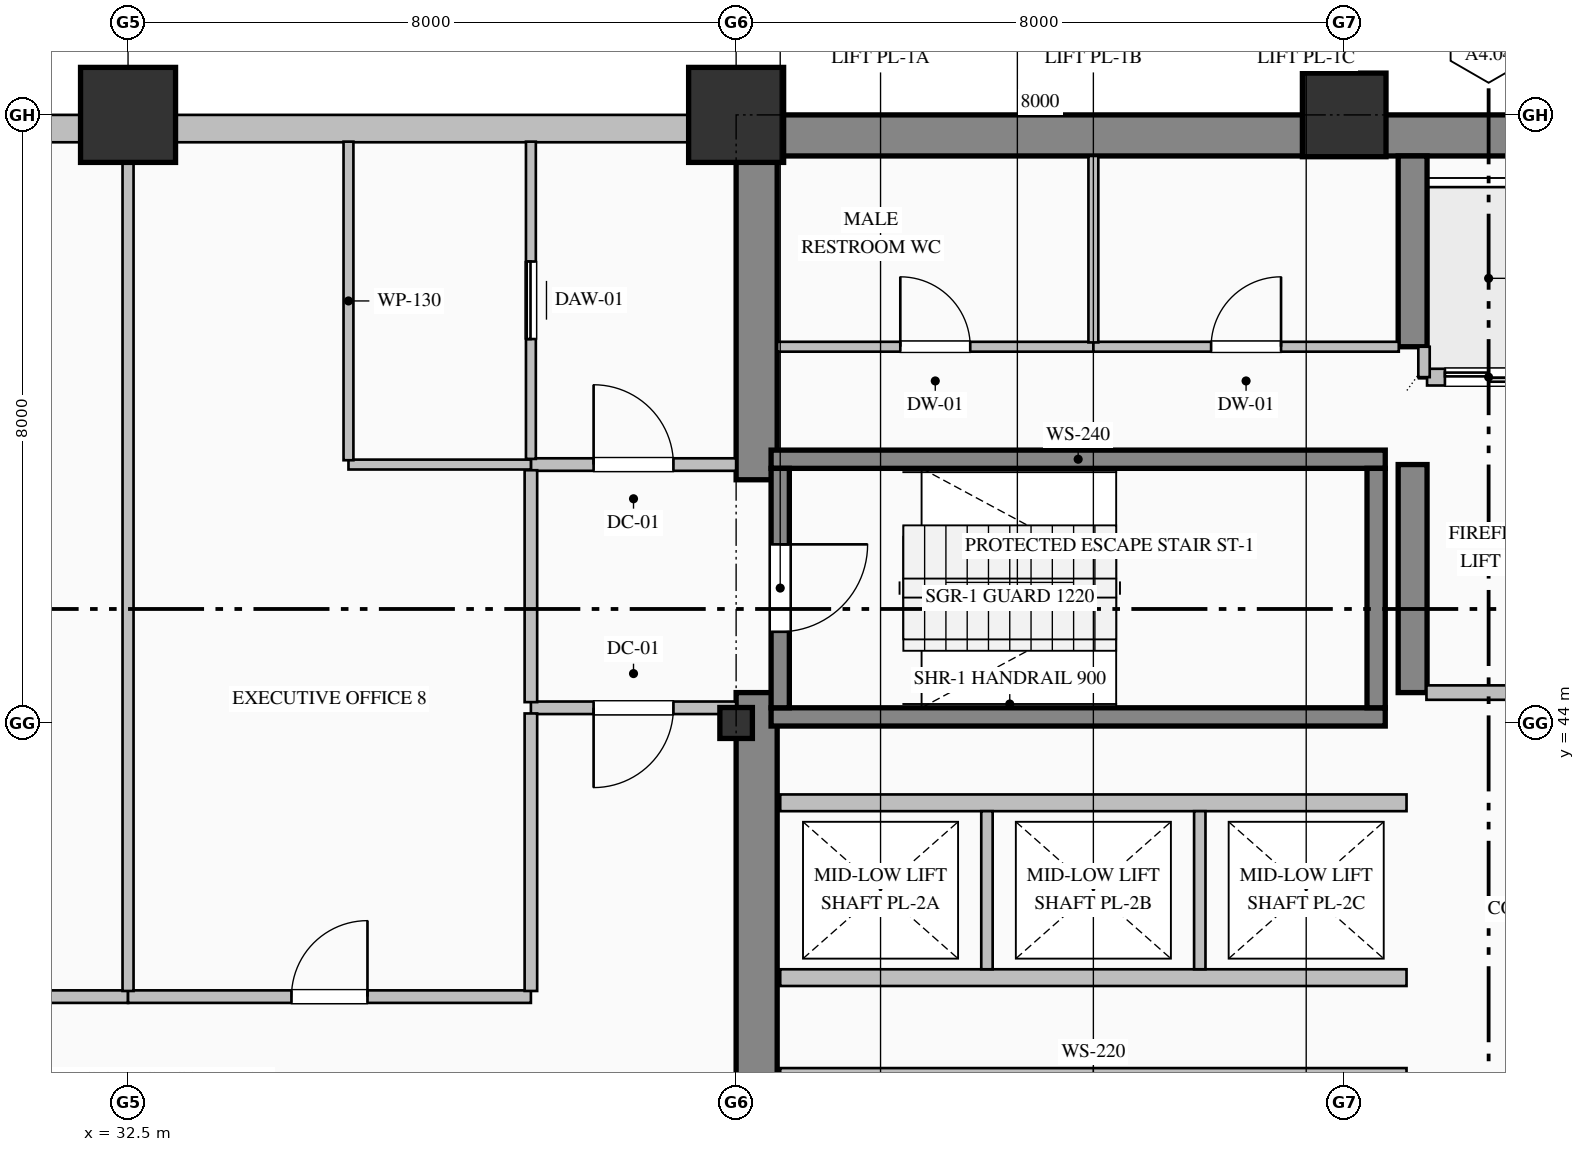
"""IFC4 building model, lengths in metres.
Left out: names, types, materials, properties, quantities, classifications, styles, units other than length and angle.
Written with IfcOpenShell. Run it as: python <this file> out.ifc"""

import sys

from ifc_helpers import new_model, si_unit, direction, frame, frame_2d, origin, origin_2d, place, context, subcontext, project, spatial, rectangle, hollow_rectangle, i_section, extrude, element, fill, save


model = new_model("IFC4")
c1 = context("Model", 3, precision=1e-05, world=origin(), true_north=direction((0.0, 1.0)))
c2 = subcontext(c1, "Body", "Model", "MODEL_VIEW")
j1 = project(units=[si_unit("LENGTHUNIT", "METRE"), si_unit("PLANEANGLEUNIT", "RADIAN")], contexts=[c1])
p1 = place(None, origin())
s1 = spatial("IfcSite", under=j1, at=p1, CompositionType="ELEMENT")
p2 = place(p1, origin())
s2 = spatial("IfcBuilding", under=s1, at=p2, CompositionType="ELEMENT")
p3 = place(p2, frame((0.0, 0.0, 36.2)))
s3 = spatial("IfcBuildingStorey", under=s2, at=p3, CompositionType="ELEMENT", Elevation=36.2)
p4 = place(p3, frame((40.5, 51.73, 0.0), z_axis=(0.0, 0.0, 1.0), x_axis=(1.0, 0.0, 0.0)))
e1 = element("IfcWall", 1, at=p4, inside=s3, PredefinedType="SHEAR", context=c2, shape_type="SweptSolid", body=[
    extrude(rectangle(XDim=23.5, YDim=0.54, at=frame_2d((11.75, 0.0))), origin(), (0.0, 0.0, 1.0), 3.75),
])
p5 = place(p3, frame((40.77, 36.54, 0.0), z_axis=(0.0, 0.0, 1.0), x_axis=(0.0, 1.0, 0.0)))
e2 = element("IfcWall", 2, at=p5, inside=s3, PredefinedType="SHEAR", context=c2, shape_type="SweptSolid", body=[
    extrude(rectangle(XDim=7.86, YDim=0.54, at=frame_2d((3.93, 0.0))), origin(), (0.0, 0.0, 1.0), 3.75),
])
p6 = place(p3, frame((40.77, 47.2, 0.0), z_axis=(0.0, 0.0, 1.0), x_axis=(0.0, 1.0, 0.0)))
e3 = element("IfcWall", 3, at=p6, inside=s3, PredefinedType="SHEAR", context=c2, shape_type="SweptSolid", body=[
    extrude(rectangle(XDim=4.26, YDim=0.54, at=frame_2d((2.13, 0.0))), origin(), (0.0, 0.0, 1.0), 3.75),
])
p7 = place(p3, frame((49.4, 44.4, 0.0), z_axis=(0.0, 0.0, 1.0), x_axis=(0.0, 1.0, 0.0)))
e4 = element("IfcWall", 4, at=p7, inside=s3, PredefinedType="SHEAR", context=c2, shape_type="SweptSolid", body=[
    extrude(rectangle(XDim=3.0, YDim=0.38, at=frame_2d((1.5, 0.0))), origin(), (0.0, 0.0, 1.0), 3.75),
])
p8 = place(p3, frame((49.4, 48.95, 0.0), z_axis=(0.0, 0.0, 1.0), x_axis=(0.0, 1.0, 0.0)))
e5 = element("IfcWall", 5, at=p8, inside=s3, PredefinedType="SHEAR", context=c2, shape_type="SweptSolid", body=[
    extrude(rectangle(XDim=2.51, YDim=0.38, at=frame_2d((1.255, 0.0))), origin(), (0.0, 0.0, 1.0), 3.75),
])
p9 = place(p3, frame((32.5, 52.0, 0.0), z_axis=(0.0, 0.0, 1.0), x_axis=(1.0, 0.0, 0.0)))
e6 = element("IfcColumn", 6, at=p9, inside=s3, PredefinedType="COLUMN", context=c2, shape_type="SweptSolid", body=[
    extrude(hollow_rectangle(XDim=1.25, YDim=1.25, WallThickness=0.045, at=origin_2d()), origin(), (0.0, 0.0, 1.0), 4.0),
])
p10 = place(p3, frame((40.5, 44.0, 0.0), z_axis=(0.0, 0.0, 1.0), x_axis=(1.0, 0.0, 0.0)))
e7 = element("IfcColumn", 7, at=p10, inside=s3, PredefinedType="COLUMN", context=c2, shape_type="SweptSolid", body=[
    extrude(i_section(OverallWidth=0.407, OverallDepth=0.428, WebThickness=0.02, FlangeThickness=0.035, FilletRadius=0.022, at=origin_2d()), origin(), (0.0, 0.0, 1.0), 4.0),
])
p11 = place(p3, frame((40.5, 52.0, 0.0), z_axis=(0.0, 0.0, 1.0), x_axis=(1.0, 0.0, 0.0)))
e8 = element("IfcColumn", 8, at=p11, inside=s3, PredefinedType="COLUMN", context=c2, shape_type="SweptSolid", body=[
    extrude(hollow_rectangle(XDim=1.25, YDim=1.25, WallThickness=0.045, at=origin_2d()), origin(), (0.0, 0.0, 1.0), 4.0),
])
p12 = place(p3, frame((48.5, 52.0, 0.0), z_axis=(0.0, 0.0, 1.0), x_axis=(1.0, 0.0, 0.0)))
e9 = element("IfcColumn", 9, at=p12, inside=s3, PredefinedType="COLUMN", context=c2, shape_type="SweptSolid", body=[
    extrude(hollow_rectangle(XDim=1.1, YDim=1.1, WallThickness=0.04, at=origin_2d()), origin(), (0.0, 0.0, 1.0), 4.0),
])
p13 = place(p3, frame((4.0, 51.82, 0.0), z_axis=(0.0, 0.0, 1.0), x_axis=(1.0, 0.0, 0.0)))
e10 = element("IfcWall", 10, at=p13, inside=s3, PredefinedType="SOLIDWALL", context=c2, shape_type="SweptSolid", body=[
    extrude(rectangle(XDim=36.52, YDim=0.36, at=frame_2d((18.26, 0.0))), origin(), (0.0, 0.0, 1.0), 3.25),
])
p14 = place(p13, frame((6.0, 0.0, 0.8)))
e11 = element("IfcOpeningElement", 11, at=p14, cuts=e10, PredefinedType="OPENING", context=c2, shape_type="SweptSolid", body=[
    extrude(rectangle(XDim=2.4, YDim=2.15, at=frame_2d((1.2, 1.075))), frame((0.0, 0.19, 0.0), z_axis=(0.0, -1.0, 0.0), x_axis=(1.0, 0.0, 0.0)), (0.0, 0.0, 1.0), 0.38),
])
p15 = place(p13, frame((24.15, 0.0, 0.85)))
e12 = element("IfcOpeningElement", 12, at=p15, cuts=e10, PredefinedType="OPENING", context=c2, shape_type="SweptSolid", body=[
    extrude(rectangle(XDim=2.1, YDim=2.05, at=frame_2d((1.05, 1.025))), frame((0.0, 0.19, 0.0), z_axis=(0.0, -1.0, 0.0), x_axis=(1.0, 0.0, 0.0)), (0.0, 0.0, 1.0), 0.38),
])
for number, where, z_axis, x_axis in (
    (13, (40.96, 47.47, 0.0), (0.0, 0.0, 1.0), (1.0, 0.0, 0.0)),
    (14, (49.04, 44.08, 0.0), (0.0, 0.0, 1.0), (-1.0, 0.0, 0.0)),
):
    element("IfcWall", number, at=place(p3, frame(where, z_axis=z_axis, x_axis=x_axis)), inside=s3, PredefinedType="SOLIDWALL", context=c2, shape_type="SweptSolid", body=[
        extrude(rectangle(XDim=8.08, YDim=0.24, at=frame_2d((4.04, 0.0))), origin(), (0.0, 0.0, 1.0), 4.0),
    ])
p16 = place(p3, frame((41.08, 47.35, 0.0), z_axis=(0.0, 0.0, 1.0), x_axis=(0.0, -1.0, 0.0)))
e15 = element("IfcWall", 15, at=p16, inside=s3, PredefinedType="SOLIDWALL", context=c2, shape_type="SweptSolid", body=[
    extrude(rectangle(XDim=3.15, YDim=0.24, at=frame_2d((1.575, 0.0))), origin(), (0.0, 0.0, 1.0), 4.0),
])
p17 = place(p16, frame((1.0, 0.0, 0.0)))
e16 = element("IfcOpeningElement", 16, at=p17, cuts=e15, PredefinedType="OPENING", context=c2, shape_type="SweptSolid", body=[
    extrude(rectangle(XDim=1.15, YDim=2.2, at=frame_2d((0.575, 1.1))), frame((0.0, 0.13, 0.0), z_axis=(0.0, -1.0, 0.0), x_axis=(1.0, 0.0, 0.0)), (0.0, 0.0, 1.0), 0.26),
])
p18 = place(p3, frame((48.92, 44.2, 0.0), z_axis=(0.0, 0.0, 1.0), x_axis=(0.0, 1.0, 0.0)))
e17 = element("IfcWall", 17, at=p18, inside=s3, PredefinedType="SOLIDWALL", context=c2, shape_type="SweptSolid", body=[
    extrude(rectangle(XDim=3.15, YDim=0.24, at=frame_2d((1.575, 0.0))), origin(), (0.0, 0.0, 1.0), 4.0),
])
p19 = place(p3, frame((54.71, 48.55, 0.0), z_axis=(0.0, 0.0, 1.0), x_axis=(-1.0, 0.0, 0.0)))
e18 = element("IfcWall", 18, at=p19, inside=s3, PredefinedType="PARTITIONING", context=c2, shape_type="SweptSolid", body=[
    extrude(rectangle(XDim=5.12, YDim=0.22, at=frame_2d((2.56, 0.0))), origin(), (0.0, 0.0, 1.0), 3.75),
])
p20 = place(p19, frame((3.735, 0.0, 0.0)))
e19 = element("IfcOpeningElement", 19, at=p20, cuts=e18, PredefinedType="OPENING", context=c2, shape_type="SweptSolid", body=[
    extrude(rectangle(XDim=1.15, YDim=2.2, at=frame_2d((0.575, 1.1))), frame((0.0, 0.12, 0.0), z_axis=(0.0, -1.0, 0.0), x_axis=(1.0, 0.0, 0.0)), (0.0, 0.0, 1.0), 0.24),
])
p21 = place(p19, frame((0.935, 0.0, 0.0)))
e20 = element("IfcOpeningElement", 20, at=p21, cuts=e18, PredefinedType="OPENING", context=c2, shape_type="SweptSolid", body=[
    extrude(rectangle(XDim=1.15, YDim=2.2, at=frame_2d((0.575, 1.1))), frame((0.0, 0.12, 0.0), z_axis=(0.0, -1.0, 0.0), x_axis=(1.0, 0.0, 0.0)), (0.0, 0.0, 1.0), 0.24),
])
p22 = place(p3, frame((49.55, 48.55, 0.0), z_axis=(0.0, 0.0, 1.0), x_axis=(0.0, 1.0, 0.0)))
e21 = element("IfcWall", 21, at=p22, inside=s3, PredefinedType="PARTITIONING", context=c2, shape_type="SweptSolid", body=[
    extrude(rectangle(XDim=0.4, YDim=0.15, at=frame_2d((0.2, 0.0))), origin(), (0.0, 0.0, 1.0), 3.75),
])
for number, where, z_axis, x_axis in (
    (22, (41.08, 39.35, 0.0), (0.0, 0.0, 1.0), (1.0, 0.0, 0.0)),
    (23, (49.32, 40.65, 0.0), (0.0, 0.0, 1.0), (-1.0, 0.0, 0.0)),
    (24, (41.08, 42.95, 0.0), (0.0, 0.0, 1.0), (1.0, 0.0, 0.0)),
):
    element("IfcWall", number, at=place(p3, frame(where, z_axis=z_axis, x_axis=x_axis)), inside=s3, PredefinedType="PARTITIONING", context=c2, shape_type="SweptSolid", body=[
        extrude(rectangle(XDim=8.24, YDim=0.22, at=frame_2d((4.12, 0.0))), origin(), (0.0, 0.0, 1.0), 3.75),
    ])
for number, where, z_axis, x_axis in (
    (25, (43.8, 40.76, 0.0), (0.0, 0.0, 1.0), (0.0, 1.0, 0.0)),
    (26, (46.6, 40.76, 0.0), (0.0, 0.0, 1.0), (0.0, 1.0, 0.0)),
):
    element("IfcWall", number, at=place(p3, frame(where, z_axis=z_axis, x_axis=x_axis)), inside=s3, PredefinedType="PARTITIONING", context=c2, shape_type="SweptSolid", body=[
        extrude(rectangle(XDim=2.08, YDim=0.15, at=frame_2d((1.04, 0.0))), origin(), (0.0, 0.0, 1.0), 3.75),
    ])
p23 = place(p3, frame((37.8, 47.4, 0.0), z_axis=(0.0, 0.0, 1.0), x_axis=(1.0, 0.0, 0.0)))
e27 = element("IfcWall", 27, at=p23, inside=s3, PredefinedType="PARTITIONING", context=c2, shape_type="SweptSolid", body=[
    extrude(rectangle(XDim=2.7, YDim=0.165, at=frame_2d((1.35, 0.0))), origin(), (0.0, 0.0, 1.0), 3.75),
])
p24 = place(p23, frame((0.825, 0.0, 0.0)))
e28 = element("IfcOpeningElement", 28, at=p24, cuts=e27, PredefinedType="OPENING", context=c2, shape_type="SweptSolid", body=[
    extrude(rectangle(XDim=1.05, YDim=2.15, at=frame_2d((0.525, 1.075))), frame((0.0, 0.093, 0.0), z_axis=(0.0, -1.0, 0.0), x_axis=(1.0, 0.0, 0.0)), (0.0, 0.0, 1.0), 0.185),
])
p25 = place(p3, frame((40.5, 44.2, 0.0), z_axis=(0.0, 0.0, 1.0), x_axis=(-1.0, 0.0, 0.0)))
e29 = element("IfcWall", 29, at=p25, inside=s3, PredefinedType="PARTITIONING", context=c2, shape_type="SweptSolid", body=[
    extrude(rectangle(XDim=2.7, YDim=0.165, at=frame_2d((1.35, 0.0))), origin(), (0.0, 0.0, 1.0), 3.75),
])
p26 = place(p25, frame((0.825, 0.0, 0.0)))
e30 = element("IfcOpeningElement", 30, at=p26, cuts=e29, PredefinedType="OPENING", context=c2, shape_type="SweptSolid", body=[
    extrude(rectangle(XDim=1.05, YDim=2.15, at=frame_2d((0.525, 1.075))), frame((0.0, 0.093, 0.0), z_axis=(0.0, -1.0, 0.0), x_axis=(1.0, 0.0, 0.0)), (0.0, 0.0, 1.0), 0.185),
])
p27 = place(p3, frame((37.8, 44.274, 0.0), z_axis=(0.0, 0.0, 1.0), x_axis=(0.0, 1.0, 0.0)))
e31 = element("IfcWall", 31, at=p27, inside=s3, PredefinedType="PARTITIONING", context=c2, shape_type="SweptSolid", body=[
    extrude(rectangle(XDim=3.051, YDim=0.165, at=frame_2d((1.525, 0.0))), origin(), (0.0, 0.0, 1.0), 3.75),
])
p28 = place(p3, frame((37.8, 47.475, 0.0), z_axis=(0.0, 0.0, 1.0), x_axis=(0.0, 1.0, 0.0)))
e32 = element("IfcWall", 32, at=p28, inside=s3, PredefinedType="PARTITIONING", context=c2, shape_type="SweptSolid", body=[
    extrude(rectangle(XDim=4.173, YDim=0.13, at=frame_2d((2.087, 0.0))), origin(), (0.0, 0.0, 1.0), 3.75),
])
p29 = place(p28, frame((1.577, 0.0, 0.0)))
e33 = element("IfcOpeningElement", 33, at=p29, cuts=e32, PredefinedType="OPENING", context=c2, shape_type="SweptSolid", body=[
    extrude(rectangle(XDim=1.02, YDim=2.15, at=frame_2d((0.51, 1.075))), frame((0.0, 0.075, 0.0), z_axis=(0.0, -1.0, 0.0), x_axis=(1.0, 0.0, 0.0)), (0.0, 0.0, 1.0), 0.15),
])
p30 = place(p3, frame((37.8, 47.4, 0.0), z_axis=(0.0, 0.0, 1.0), x_axis=(-1.0, 0.0, 0.0)))
e34 = element("IfcWall", 34, at=p30, inside=s3, PredefinedType="PARTITIONING", context=c2, shape_type="SweptSolid", body=[
    extrude(rectangle(XDim=2.4, YDim=0.13, at=frame_2d((1.2, 0.0))), origin(), (0.0, 0.0, 1.0), 3.75),
])
p31 = place(p3, frame((35.4, 47.457, 0.0), z_axis=(0.0, 0.0, 1.0), x_axis=(0.0, 1.0, 0.0)))
e35 = element("IfcWall", 35, at=p31, inside=s3, PredefinedType="PARTITIONING", context=c2, shape_type="SweptSolid", body=[
    extrude(rectangle(XDim=4.191, YDim=0.13, at=frame_2d((2.095, 0.0))), origin(), (0.0, 0.0, 1.0), 3.75),
])
p32 = place(p3, frame((41.04, 48.95, 0.0), z_axis=(0.0, 0.0, 1.0), x_axis=(1.0, 0.0, 0.0)))
e36 = element("IfcWall", 36, at=p32, inside=s3, PredefinedType="PARTITIONING", context=c2, shape_type="SweptSolid", body=[
    extrude(rectangle(XDim=4.16, YDim=0.13, at=frame_2d((2.08, 0.0))), origin(), (0.0, 0.0, 1.0), 3.75),
])
p33 = place(p32, frame((1.62, 0.0, 0.0)))
e37 = element("IfcOpeningElement", 37, at=p33, cuts=e36, PredefinedType="OPENING", context=c2, shape_type="SweptSolid", body=[
    extrude(rectangle(XDim=0.92, YDim=2.15, at=frame_2d((0.46, 1.075))), frame((0.0, 0.075, 0.0), z_axis=(0.0, -1.0, 0.0), x_axis=(1.0, 0.0, 0.0)), (0.0, 0.0, 1.0), 0.15),
])
p34 = place(p3, frame((45.2, 48.95, 0.0), z_axis=(0.0, 0.0, 1.0), x_axis=(1.0, 0.0, 0.0)))
e38 = element("IfcWall", 38, at=p34, inside=s3, PredefinedType="PARTITIONING", context=c2, shape_type="SweptSolid", body=[
    extrude(rectangle(XDim=4.018, YDim=0.13, at=frame_2d((2.009, 0.0))), origin(), (0.0, 0.0, 1.0), 3.75),
])
p35 = place(p34, frame((1.549, 0.0, 0.0)))
e39 = element("IfcOpeningElement", 39, at=p35, cuts=e38, PredefinedType="OPENING", context=c2, shape_type="SweptSolid", body=[
    extrude(rectangle(XDim=0.92, YDim=2.15, at=frame_2d((0.46, 1.075))), frame((0.0, 0.075, 0.0), z_axis=(0.0, -1.0, 0.0), x_axis=(1.0, 0.0, 0.0)), (0.0, 0.0, 1.0), 0.15),
])
p36 = place(p3, frame((54.718, 44.4, 0.0), z_axis=(0.0, 0.0, 1.0), x_axis=(-1.0, 0.0, 0.0)))
e40 = element("IfcWall", 40, at=p36, inside=s3, PredefinedType="PARTITIONING", context=c2, shape_type="SweptSolid", body=[
    extrude(rectangle(XDim=5.136, YDim=0.19, at=frame_2d((2.568, 0.0))), origin(), (0.0, 0.0, 1.0), 3.75),
])
p37 = place(p36, frame((2.043, 0.0, 0.0)))
e41 = element("IfcOpeningElement", 41, at=p37, cuts=e40, PredefinedType="OPENING", context=c2, shape_type="SweptSolid", body=[
    extrude(rectangle(XDim=1.05, YDim=2.15, at=frame_2d((0.525, 1.075))), frame((0.0, 0.105, 0.0), z_axis=(0.0, -1.0, 0.0), x_axis=(1.0, 0.0, 0.0)), (0.0, 0.0, 1.0), 0.21),
])
p38 = place(p3, frame((45.2, 51.46, 0.0), z_axis=(0.0, 0.0, 1.0), x_axis=(0.0, -1.0, 0.0)))
e42 = element("IfcWall", 42, at=p38, inside=s3, PredefinedType="PARTITIONING", context=c2, shape_type="SweptSolid", body=[
    extrude(rectangle(XDim=2.453, YDim=0.13, at=frame_2d((1.227, 0.0))), origin(), (0.0, 0.0, 1.0), 3.75),
])
p39 = place(p3, frame((26.8, 40.4, 0.0), z_axis=(0.0, 0.0, 1.0), x_axis=(1.0, 0.0, 0.0)))
e43 = element("IfcWall", 43, at=p39, inside=s3, PredefinedType="PARTITIONING", context=c2, shape_type="SweptSolid", body=[
    extrude(rectangle(XDim=5.7, YDim=0.165, at=frame_2d((2.85, 0.0))), origin(), (0.0, 0.0, 1.0), 3.75),
])
p40 = place(p39, frame((2.3, 0.0, 0.0)))
e44 = element("IfcOpeningElement", 44, at=p40, cuts=e43, PredefinedType="OPENING", context=c2, shape_type="SweptSolid", body=[
    extrude(rectangle(XDim=1.1, YDim=2.2, at=frame_2d((0.55, 1.1))), frame((0.0, 0.093, 0.0), z_axis=(0.0, -1.0, 0.0), x_axis=(1.0, 0.0, 0.0)), (0.0, 0.0, 1.0), 0.185),
])
p41 = place(p3, frame((32.5, 40.4, 0.0), z_axis=(0.0, 0.0, 1.0), x_axis=(1.0, 0.0, 0.0)))
e45 = element("IfcWall", 45, at=p41, inside=s3, PredefinedType="PARTITIONING", context=c2, shape_type="SweptSolid", body=[
    extrude(rectangle(XDim=5.3, YDim=0.165, at=frame_2d((2.65, 0.0))), origin(), (0.0, 0.0, 1.0), 3.75),
])
p42 = place(p41, frame((2.15, 0.0, 0.0)))
e46 = element("IfcOpeningElement", 46, at=p42, cuts=e45, PredefinedType="OPENING", context=c2, shape_type="SweptSolid", body=[
    extrude(rectangle(XDim=1.0, YDim=2.15, at=frame_2d((0.5, 1.075))), frame((0.0, 0.093, 0.0), z_axis=(0.0, -1.0, 0.0), x_axis=(1.0, 0.0, 0.0)), (0.0, 0.0, 1.0), 0.185),
])
p43 = place(p3, frame((37.8, 40.475, 0.0), z_axis=(0.0, 0.0, 1.0), x_axis=(0.0, 1.0, 0.0)))
e47 = element("IfcWall", 47, at=p43, inside=s3, PredefinedType="PARTITIONING", context=c2, shape_type="SweptSolid", body=[
    extrude(rectangle(XDim=3.651, YDim=0.165, at=frame_2d((1.825, 0.0))), origin(), (0.0, 0.0, 1.0), 3.75),
])
p44 = place(p3, frame((32.5, 51.648, 0.0), z_axis=(0.0, 0.0, 1.0), x_axis=(0.0, -1.0, 0.0)))
e48 = element("IfcWall", 48, at=p44, inside=s3, PredefinedType="PARTITIONING", context=c2, shape_type="SweptSolid", body=[
    extrude(rectangle(XDim=11.173, YDim=0.145, at=frame_2d((5.587, 0.0))), origin(), (0.0, 0.0, 1.0), 3.75),
])
p45 = place(p17, origin())
e49 = element("IfcDoor", 49, at=p45, inside=s3, OperationType="SINGLE_SWING_LEFT", PredefinedType="DOOR", context=c2, shape_type="SweptSolid", body=[
    extrude(rectangle(XDim=1.15, YDim=2.2, at=frame_2d((0.575, 1.1))), frame((0.0, 0.025, 0.0), z_axis=(0.0, -1.0, 0.0), x_axis=(1.0, 0.0, 0.0)), (0.0, 0.0, 1.0), 0.05),
])
fill(e16, e49)
p46 = place(p20, origin())
e50 = element("IfcDoor", 50, at=p46, inside=s3, OperationType="DOUBLE_DOOR_SLIDING", PredefinedType="DOOR", context=c2, shape_type="SweptSolid", body=[
    extrude(rectangle(XDim=1.15, YDim=2.2, at=frame_2d((0.575, 1.1))), frame((0.0, 0.025, 0.0), z_axis=(0.0, -1.0, 0.0), x_axis=(1.0, 0.0, 0.0)), (0.0, 0.0, 1.0), 0.05),
])
fill(e19, e50)
p47 = place(p24, origin())
e51 = element("IfcDoor", 51, at=p47, inside=s3, OperationType="SINGLE_SWING_LEFT", PredefinedType="DOOR", context=c2, shape_type="SweptSolid", body=[
    extrude(rectangle(XDim=1.05, YDim=2.15, at=frame_2d((0.525, 1.075))), frame((0.0, 0.025, 0.0), z_axis=(0.0, -1.0, 0.0), x_axis=(1.0, 0.0, 0.0)), (0.0, 0.0, 1.0), 0.05),
])
fill(e28, e51)
p48 = place(p26, origin())
e52 = element("IfcDoor", 52, at=p48, inside=s3, OperationType="SINGLE_SWING_RIGHT", PredefinedType="DOOR", context=c2, shape_type="SweptSolid", body=[
    extrude(rectangle(XDim=1.05, YDim=2.15, at=frame_2d((0.525, 1.075))), frame((0.0, 0.025, 0.0), z_axis=(0.0, -1.0, 0.0), x_axis=(1.0, 0.0, 0.0)), (0.0, 0.0, 1.0), 0.05),
])
fill(e30, e52)
p49 = place(p29, origin())
e53 = element("IfcDoor", 53, at=p49, inside=s3, OperationType="SLIDING_TO_LEFT", PredefinedType="DOOR", context=c2, shape_type="SweptSolid", body=[
    extrude(rectangle(XDim=1.02, YDim=2.15, at=frame_2d((0.51, 1.075))), frame((0.0, 0.025, 0.0), z_axis=(0.0, -1.0, 0.0), x_axis=(1.0, 0.0, 0.0)), (0.0, 0.0, 1.0), 0.05),
])
fill(e33, e53)
p50 = place(p33, origin())
e54 = element("IfcDoor", 54, at=p50, inside=s3, OperationType="SINGLE_SWING_LEFT", PredefinedType="DOOR", context=c2, shape_type="SweptSolid", body=[
    extrude(rectangle(XDim=0.92, YDim=2.15, at=frame_2d((0.46, 1.075))), frame((0.0, 0.025, 0.0), z_axis=(0.0, -1.0, 0.0), x_axis=(1.0, 0.0, 0.0)), (0.0, 0.0, 1.0), 0.05),
])
fill(e37, e54)
p51 = place(p35, origin())
e55 = element("IfcDoor", 55, at=p51, inside=s3, OperationType="SINGLE_SWING_RIGHT", PredefinedType="DOOR", context=c2, shape_type="SweptSolid", body=[
    extrude(rectangle(XDim=0.92, YDim=2.15, at=frame_2d((0.46, 1.075))), frame((0.0, 0.025, 0.0), z_axis=(0.0, -1.0, 0.0), x_axis=(1.0, 0.0, 0.0)), (0.0, 0.0, 1.0), 0.05),
])
fill(e39, e55)
p52 = place(p42, origin())
e56 = element("IfcDoor", 56, at=p52, inside=s3, OperationType="SINGLE_SWING_RIGHT", PredefinedType="DOOR", context=c2, shape_type="SweptSolid", body=[
    extrude(rectangle(XDim=1.0, YDim=2.15, at=frame_2d((0.5, 1.075))), frame((0.0, 0.025, 0.0), z_axis=(0.0, -1.0, 0.0), x_axis=(1.0, 0.0, 0.0)), (0.0, 0.0, 1.0), 0.05),
])
fill(e46, e56)
save(model, sys.argv[1])
